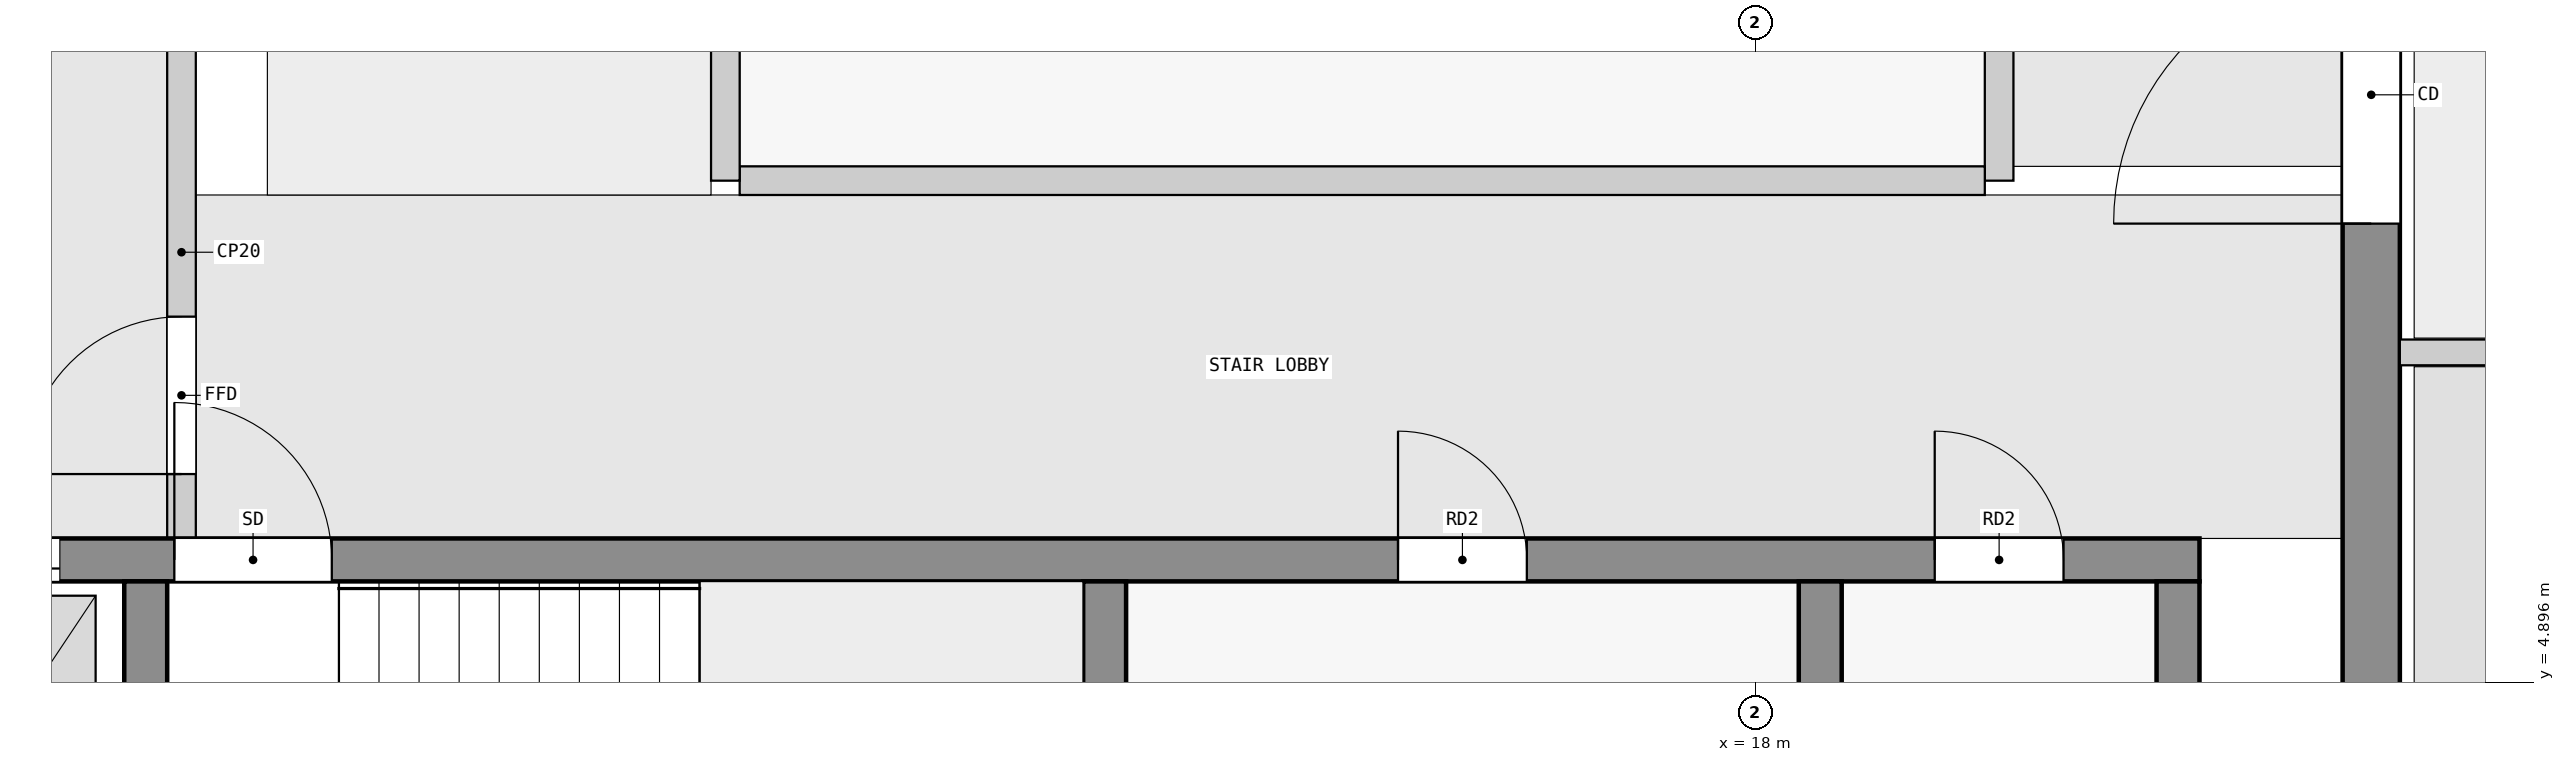
"""IFC4 building model, lengths in metres.
Left out: names, types, materials, properties, quantities, classifications, styles, units other than length and angle.
Written with IfcOpenShell. Run it as: python <this file> out.ifc"""

import sys

from ifc_helpers import new_model, si_unit, direction, frame, frame_2d, origin, place, context, subcontext, project, spatial, rectangle, extrude, element, fill, save


model = new_model("IFC4")
c1 = context("Model", 3, precision=1e-05, world=origin(), true_north=direction((0.0, 1.0)))
c2 = subcontext(c1, "Body", "Model", "MODEL_VIEW")
j1 = project(units=[si_unit("LENGTHUNIT", "METRE"), si_unit("PLANEANGLEUNIT", "RADIAN")], contexts=[c1])
p1 = place(None, origin())
s1 = spatial("IfcSite", under=j1, at=p1, CompositionType="ELEMENT")
p2 = place(p1, origin())
s2 = spatial("IfcBuilding", under=s1, at=p2, CompositionType="ELEMENT")
p3 = place(p2, frame((0.0, 0.0, 308.9)))
s3 = spatial("IfcBuildingStorey", under=s2, at=p3, CompositionType="ELEMENT", Elevation=308.9)
p4 = place(p3, frame((22.3, 2.5, 0.0), z_axis=(0.0, 0.0, 1.0), x_axis=(0.0, 1.0, 0.0)))
e1 = element("IfcWall", 1, at=p4, inside=s3, PredefinedType="SHEAR", context=c2, shape_type="SweptSolid", body=[
    extrude(rectangle(XDim=15.1, YDim=0.4, at=frame_2d((7.55, 0.0))), origin(), (0.0, 0.0, 1.0), 3.2),
])
p5 = place(p4, frame((5.6, 0.0, 0.0)))
e2 = element("IfcOpeningElement", 2, at=p5, cuts=e1, PredefinedType="OPENING", context=c2, shape_type="SweptSolid", body=[
    extrude(rectangle(XDim=1.8, YDim=2.1, at=frame_2d((0.9, 1.05))), frame((0.0, 0.21, 0.0), z_axis=(0.0, -1.0, 0.0), x_axis=(1.0, 0.0, 0.0)), (0.0, 0.0, 1.0), 0.42),
])
for number, where, z_axis, x_axis in (
    (3, (6.75, 2.8, 0.0), (0.0, 0.0, 1.0), (0.0, 1.0, 0.0)),
    (4, (13.45, 2.8, 0.0), (0.0, 0.0, 1.0), (0.0, 1.0, 0.0)),
    (5, (18.45, 2.8, 0.0), (0.0, 0.0, 1.0), (0.0, 1.0, 0.0)),
    (6, (20.95, 2.8, 0.0), (0.0, 0.0, 1.0), (0.0, 1.0, 0.0)),
):
    element("IfcWall", number, at=place(p3, frame(where, z_axis=z_axis, x_axis=x_axis)), inside=s3, PredefinedType="SHEAR", context=c2, shape_type="SweptSolid", body=[
        extrude(rectangle(XDim=2.8, YDim=0.3, at=frame_2d((1.4, 0.0))), origin(), (0.0, 0.0, 1.0), 3.2),
    ])
p6 = place(p3, frame((2.3, 5.75, 0.0), z_axis=(0.0, 0.0, 1.0), x_axis=(1.0, 0.0, 0.0)))
e7 = element("IfcWall", 7, at=p6, inside=s3, PredefinedType="SHEAR", context=c2, shape_type="SweptSolid", body=[
    extrude(rectangle(XDim=18.8, YDim=0.3, at=frame_2d((9.4, 0.0))), origin(), (0.0, 0.0, 1.0), 3.2),
])
p7 = place(p6, frame((4.65, 0.0, 0.0)))
e8 = element("IfcOpeningElement", 8, at=p7, cuts=e7, PredefinedType="OPENING", context=c2, shape_type="SweptSolid", body=[
    extrude(rectangle(XDim=1.1, YDim=2.1, at=frame_2d((0.55, 1.05))), frame((0.0, 0.16, 0.0), z_axis=(0.0, -1.0, 0.0), x_axis=(1.0, 0.0, 0.0)), (0.0, 0.0, 1.0), 0.32),
])
p8 = place(p6, frame((0.45, 0.0, 0.0)))
e9 = element("IfcOpeningElement", 9, at=p8, cuts=e7, PredefinedType="OPENING", context=c2, shape_type="SweptSolid", body=[
    extrude(rectangle(XDim=1.1, YDim=2.1, at=frame_2d((0.55, 1.05))), frame((0.0, 0.16, 0.0), z_axis=(0.0, -1.0, 0.0), x_axis=(1.0, 0.0, 0.0)), (0.0, 0.0, 1.0), 0.32),
])
p9 = place(p6, frame((2.75, 0.0, 0.0)))
e10 = element("IfcOpeningElement", 10, at=p9, cuts=e7, PredefinedType="OPENING", context=c2, shape_type="SweptSolid", body=[
    extrude(rectangle(XDim=1.1, YDim=2.1, at=frame_2d((0.55, 1.05))), frame((0.0, 0.16, 0.0), z_axis=(0.0, -1.0, 0.0), x_axis=(1.0, 0.0, 0.0)), (0.0, 0.0, 1.0), 0.32),
])
p10 = place(p6, frame((13.2, 0.0, 0.0)))
e11 = element("IfcOpeningElement", 11, at=p10, cuts=e7, PredefinedType="OPENING", context=c2, shape_type="SweptSolid", body=[
    extrude(rectangle(XDim=0.9, YDim=2.1, at=frame_2d((0.45, 1.05))), frame((0.0, 0.16, 0.0), z_axis=(0.0, -1.0, 0.0), x_axis=(1.0, 0.0, 0.0)), (0.0, 0.0, 1.0), 0.32),
])
p11 = place(p6, frame((16.95, 0.0, 0.0)))
e12 = element("IfcOpeningElement", 12, at=p11, cuts=e7, PredefinedType="OPENING", context=c2, shape_type="SweptSolid", body=[
    extrude(rectangle(XDim=0.9, YDim=2.1, at=frame_2d((0.45, 1.05))), frame((0.0, 0.16, 0.0), z_axis=(0.0, -1.0, 0.0), x_axis=(1.0, 0.0, 0.0)), (0.0, 0.0, 1.0), 0.32),
])
p12 = place(p3, frame((7.0, 5.9, 0.0), z_axis=(0.0, 0.0, 1.0), x_axis=(0.0, 1.0, 0.0)))
e13 = element("IfcWall", 13, at=p12, inside=s3, PredefinedType="PARTITIONING", context=c2, shape_type="SweptSolid", body=[
    extrude(rectangle(XDim=4.0, YDim=0.2, at=frame_2d((2.0, 0.0))), origin(), (0.0, 0.0, 1.0), 3.2),
])
p13 = place(p12, frame((0.45, 0.0, 0.0)))
e14 = element("IfcOpeningElement", 14, at=p13, cuts=e13, PredefinedType="OPENING", context=c2, shape_type="SweptSolid", body=[
    extrude(rectangle(XDim=1.1, YDim=2.1, at=frame_2d((0.55, 1.05))), frame((0.0, 0.11, 0.0), z_axis=(0.0, -1.0, 0.0), x_axis=(1.0, 0.0, 0.0)), (0.0, 0.0, 1.0), 0.22),
])
p14 = place(p3, frame((10.8, 8.4, 0.0), z_axis=(0.0, 0.0, 1.0), x_axis=(0.0, 1.0, 0.0)))
e15 = element("IfcWall", 15, at=p14, inside=s3, PredefinedType="PARTITIONING", context=c2, shape_type="SweptSolid", body=[
    extrude(rectangle(XDim=3.8, YDim=0.2, at=frame_2d((1.9, 0.0))), origin(), (0.0, 0.0, 1.0), 3.2),
])
p15 = place(p3, frame((10.9, 8.4, 0.0), z_axis=(0.0, 0.0, 1.0), x_axis=(1.0, 0.0, 0.0)))
e16 = element("IfcWall", 16, at=p15, inside=s3, PredefinedType="PARTITIONING", context=c2, shape_type="SweptSolid", body=[
    extrude(rectangle(XDim=8.7, YDim=0.2, at=frame_2d((4.35, 0.0))), origin(), (0.0, 0.0, 1.0), 3.2),
])
p16 = place(p3, frame((19.7, 8.4, 0.0), z_axis=(0.0, 0.0, 1.0), x_axis=(0.0, 1.0, 0.0)))
e17 = element("IfcWall", 17, at=p16, inside=s3, PredefinedType="PARTITIONING", context=c2, shape_type="SweptSolid", body=[
    extrude(rectangle(XDim=3.8, YDim=0.2, at=frame_2d((1.9, 0.0))), origin(), (0.0, 0.0, 1.0), 3.2),
])
p17 = place(p3, frame((27.0, 7.2, 0.0), z_axis=(0.0, 0.0, 1.0), x_axis=(-1.0, 0.0, 0.0)))
e18 = element("IfcWall", 18, at=p17, inside=s3, PredefinedType="PARTITIONING", context=c2, shape_type="SweptSolid", body=[
    extrude(rectangle(XDim=4.5, YDim=0.18, at=frame_2d((2.25, 0.0))), origin(), (0.0, 0.0, 1.0), 2.592),
])
p18 = place(p17, frame((1.35, 0.0, 0.0)))
e19 = element("IfcOpeningElement", 19, at=p18, cuts=e18, PredefinedType="OPENING", context=c2, shape_type="SweptSolid", body=[
    extrude(rectangle(XDim=1.6, YDim=2.4, at=frame_2d((0.8, 1.2))), frame((0.0, 0.1, 0.0), z_axis=(0.0, -1.0, 0.0), x_axis=(1.0, 0.0, 0.0)), (0.0, 0.0, 1.0), 0.2),
])
p19 = place(p13, origin())
e20 = element("IfcDoor", 20, at=p19, inside=s3, OperationType="SINGLE_SWING_LEFT", PredefinedType="DOOR", context=c2, shape_type="SweptSolid", body=[
    extrude(rectangle(XDim=1.1, YDim=2.1, at=frame_2d((0.55, 1.05))), frame((0.0, 0.025, 0.0), z_axis=(0.0, -1.0, 0.0), x_axis=(1.0, 0.0, 0.0)), (0.0, 0.0, 1.0), 0.05),
])
fill(e14, e20)
p20 = place(p7, origin())
e21 = element("IfcDoor", 21, at=p20, inside=s3, OperationType="SINGLE_SWING_LEFT", PredefinedType="DOOR", context=c2, shape_type="SweptSolid", body=[
    extrude(rectangle(XDim=1.1, YDim=2.1, at=frame_2d((0.55, 1.05))), frame((0.0, 0.025, 0.0), z_axis=(0.0, -1.0, 0.0), x_axis=(1.0, 0.0, 0.0)), (0.0, 0.0, 1.0), 0.05),
])
fill(e8, e21)
p21 = place(p9, origin())
e22 = element("IfcDoor", 22, at=p21, inside=s3, OperationType="DOUBLE_DOOR_SLIDING", PredefinedType="DOOR", context=c2, shape_type="SweptSolid", body=[
    extrude(rectangle(XDim=1.1, YDim=2.1, at=frame_2d((0.55, 1.05))), frame((0.0, 0.025, 0.0), z_axis=(0.0, -1.0, 0.0), x_axis=(1.0, 0.0, 0.0)), (0.0, 0.0, 1.0), 0.05),
])
fill(e10, e22)
p22 = place(p5, origin())
e23 = element("IfcDoor", 23, at=p22, inside=s3, OperationType="DOUBLE_DOOR_SINGLE_SWING", PredefinedType="DOOR", context=c2, shape_type="SweptSolid", body=[
    extrude(rectangle(XDim=1.8, YDim=2.1, at=frame_2d((0.9, 1.05))), frame((0.0, 0.025, 0.0), z_axis=(0.0, -1.0, 0.0), x_axis=(1.0, 0.0, 0.0)), (0.0, 0.0, 1.0), 0.05),
])
fill(e2, e23)
p23 = place(p10, origin())
e24 = element("IfcDoor", 24, at=p23, inside=s3, OperationType="SINGLE_SWING_LEFT", PredefinedType="DOOR", context=c2, shape_type="SweptSolid", body=[
    extrude(rectangle(XDim=0.9, YDim=2.1, at=frame_2d((0.45, 1.05))), frame((0.0, 0.025, 0.0), z_axis=(0.0, -1.0, 0.0), x_axis=(1.0, 0.0, 0.0)), (0.0, 0.0, 1.0), 0.05),
])
fill(e11, e24)
p24 = place(p11, origin())
e25 = element("IfcDoor", 25, at=p24, inside=s3, OperationType="SINGLE_SWING_LEFT", PredefinedType="DOOR", context=c2, shape_type="SweptSolid", body=[
    extrude(rectangle(XDim=0.9, YDim=2.1, at=frame_2d((0.45, 1.05))), frame((0.0, 0.025, 0.0), z_axis=(0.0, -1.0, 0.0), x_axis=(1.0, 0.0, 0.0)), (0.0, 0.0, 1.0), 0.05),
])
fill(e12, e25)
save(model, sys.argv[1])
